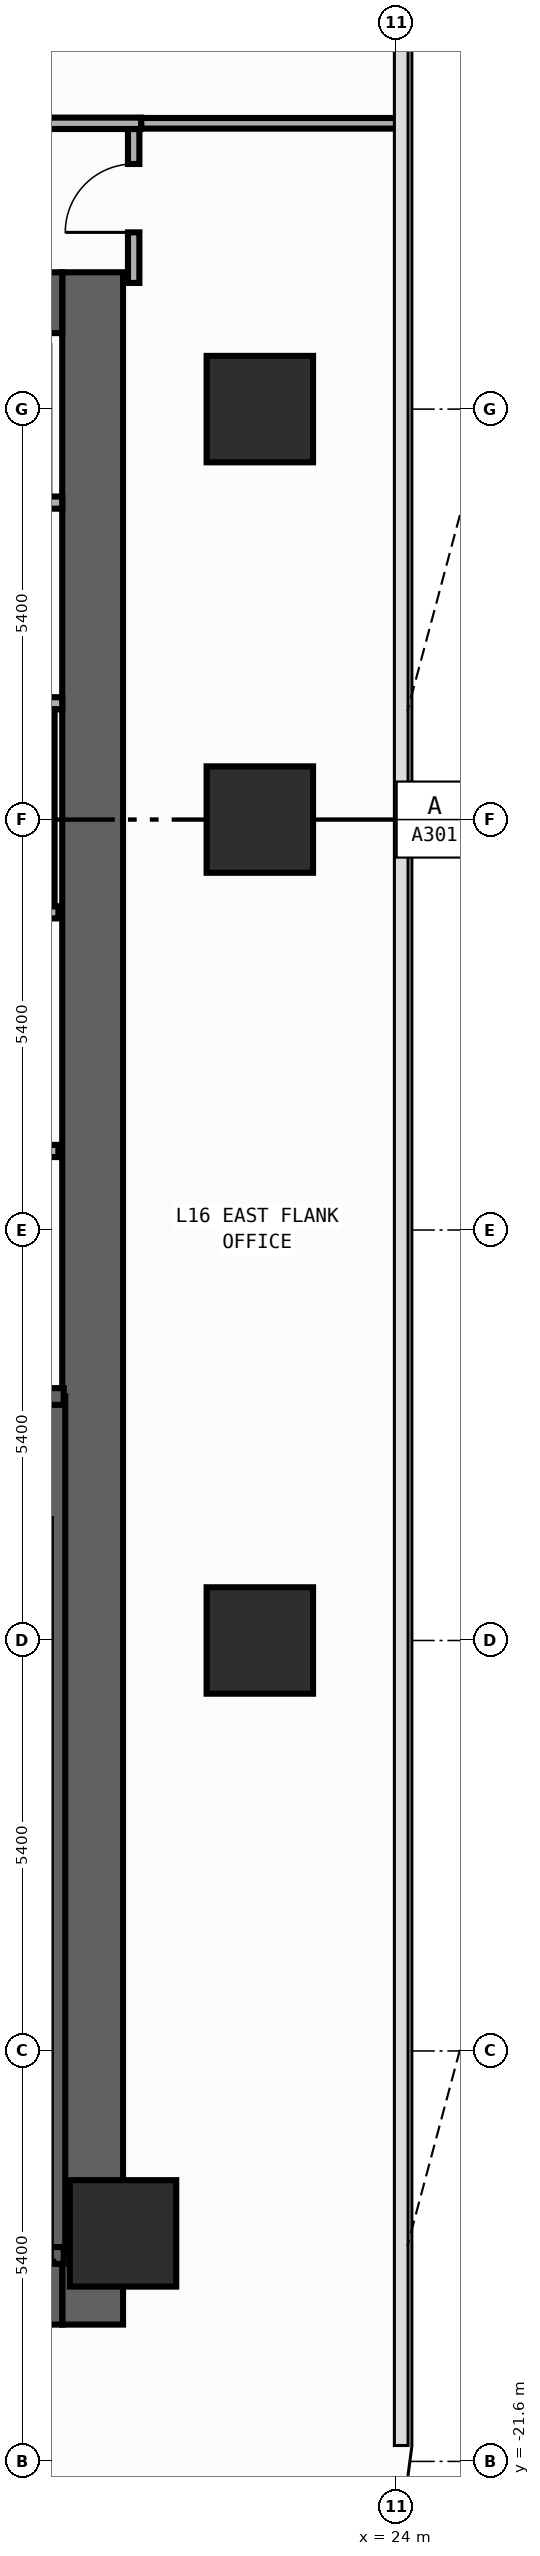
"""IFC4 building model, lengths in metres.
Left out: names, types, materials, properties, quantities, classifications, styles, units other than length and angle.
Written with IfcOpenShell. Run it as: python <this file> out.ifc"""

import sys

from ifc_helpers import new_model, si_unit, direction, frame, frame_2d, origin, origin_2d, place, context, subcontext, project, spatial, rectangle, extrude, element, fill, save


model = new_model("IFC4")
c1 = context("Model", 3, precision=1e-05, world=origin(), true_north=direction((0.0, 1.0)))
c2 = subcontext(c1, "Body", "Model", "MODEL_VIEW")
j1 = project(units=[si_unit("LENGTHUNIT", "METRE"), si_unit("PLANEANGLEUNIT", "RADIAN")], contexts=[c1])
p1 = place(None, origin())
s1 = spatial("IfcSite", under=j1, at=p1, CompositionType="ELEMENT")
p2 = place(p1, origin())
s2 = spatial("IfcBuilding", under=s1, at=p2, CompositionType="ELEMENT")
p3 = place(p2, frame((0.0, 0.0, 68.0)))
s3 = spatial("IfcBuildingStorey", under=s2, at=p3, CompositionType="ELEMENT", Elevation=68.0)
p4 = place(p3, frame((20.0, -19.8, 0.0), z_axis=(0.0, 0.0, 1.0), x_axis=(0.0, 1.0, 0.0)))
e1 = element("IfcWall", 1, at=p4, inside=s3, PredefinedType="SHEAR", context=c2, shape_type="SweptSolid", body=[
    extrude(rectangle(XDim=27.0, YDim=0.8, at=frame_2d((13.5, 0.0))), origin(), (0.0, 0.0, 1.0), 3.94),
])
for number, where, z_axis, x_axis in (
    (2, (12.8, -19.4, 0.0), (0.0, 0.0, 1.0), (1.0, 0.0, 0.0)),
    (3, (12.8, 6.8, 0.0), (0.0, 0.0, 1.0), (1.0, 0.0, 0.0)),
):
    element("IfcWall", number, at=place(p3, frame(where, z_axis=z_axis, x_axis=x_axis)), inside=s3, PredefinedType="SHEAR", context=c2, shape_type="SweptSolid", body=[
        extrude(rectangle(XDim=6.8, YDim=0.8, at=frame_2d((3.4, 0.0))), origin(), (0.0, 0.0, 1.0), 3.94),
    ])
p5 = place(p3, frame((19.53, -18.89, 0.0), z_axis=(0.0, 0.0, 1.0), x_axis=(0.0, 1.0, 0.0)))
e4 = element("IfcWall", 4, at=p5, inside=s3, PredefinedType="SHEAR", context=c2, shape_type="SweptSolid", body=[
    extrude(rectangle(XDim=11.3, YDim=0.22, at=frame_2d((5.65, 0.0))), origin(), (0.0, 0.0, 1.0), 3.94),
])
p6 = place(p3, frame((15.705, -18.89, 0.0), z_axis=(0.0, 0.0, 1.0), x_axis=(1.0, 0.0, 0.0)))
e5 = element("IfcWall", 5, at=p6, inside=s3, PredefinedType="SHEAR", context=c2, shape_type="SweptSolid", body=[
    extrude(rectangle(XDim=3.915, YDim=0.22, at=frame_2d((1.958, 0.0))), origin(), (0.0, 0.0, 1.0), 3.94),
])
p7 = place(p3, frame((19.62, -7.59, 0.0), z_axis=(0.0, 0.0, 1.0), x_axis=(-1.0, 0.0, 0.0)))
e6 = element("IfcWall", 6, at=p7, inside=s3, PredefinedType="SHEAR", context=c2, shape_type="SweptSolid", body=[
    extrude(rectangle(XDim=3.915, YDim=0.22, at=frame_2d((1.958, 0.0))), origin(), (0.0, 0.0, 1.0), 3.94),
])
p8 = place(p7, frame((1.08, 0.0, 0.0)))
e7 = element("IfcOpeningElement", 7, at=p8, cuts=e6, PredefinedType="OPENING", context=c2, shape_type="SweptSolid", body=[
    extrude(rectangle(XDim=1.1, YDim=2.2, at=frame_2d((0.55, 1.1))), frame((0.0, 0.12, 0.0), z_axis=(0.0, -1.0, 0.0), x_axis=(1.0, 0.0, 0.0)), (0.0, 0.0, 1.0), 0.24),
])
for number, where, z_axis, x_axis in (
    (8, (20.4, -18.6, 0.0), (0.0, 0.0, 1.0), (1.0, 0.0, 0.0)),
    (9, (22.2, -10.8, 0.0), (0.0, 0.0, 1.0), (1.0, 0.0, 0.0)),
    (10, (22.2, 0.0, 0.0), (0.0, 0.0, 1.0), (1.0, 0.0, 0.0)),
    (11, (22.2, 5.4, 0.0), (0.0, 0.0, 1.0), (1.0, 0.0, 0.0)),
):
    element("IfcColumn", number, at=place(p3, frame(where, z_axis=z_axis, x_axis=x_axis)), inside=s3, PredefinedType="COLUMN", context=c2, shape_type="SweptSolid", body=[
        extrude(rectangle(XDim=1.4, YDim=1.4, at=origin_2d()), origin(), (0.0, 0.0, 1.0), 4.2),
    ])
p9 = place(p3, frame((15.75, -4.36, 0.0), z_axis=(0.0, 0.0, 1.0), x_axis=(1.0, 0.0, 0.0)))
e12 = element("IfcWall", 12, at=p9, inside=s3, PredefinedType="STANDARD", context=c2, shape_type="SweptSolid", body=[
    extrude(rectangle(XDim=3.8, YDim=0.16, at=frame_2d((1.9, 0.0))), origin(), (0.0, 0.0, 1.0), 3.94),
])
p10 = place(p9, frame((1.47, 0.0, 0.0)))
e13 = element("IfcOpeningElement", 13, at=p10, cuts=e12, PredefinedType="OPENING", context=c2, shape_type="SweptSolid", body=[
    extrude(rectangle(XDim=1.15, YDim=2.2, at=frame_2d((0.575, 1.1))), frame((0.0, 0.09, 0.0), z_axis=(0.0, -1.0, 0.0), x_axis=(1.0, 0.0, 0.0)), (0.0, 0.0, 1.0), 0.18),
])
p11 = place(p3, frame((15.75, -1.22, 0.0), z_axis=(0.0, 0.0, 1.0), x_axis=(1.0, 0.0, 0.0)))
e14 = element("IfcWall", 14, at=p11, inside=s3, PredefinedType="STANDARD", context=c2, shape_type="SweptSolid", body=[
    extrude(rectangle(XDim=3.8, YDim=0.16, at=frame_2d((1.9, 0.0))), origin(), (0.0, 0.0, 1.0), 3.94),
])
for number, where, z_axis, x_axis in (
    (15, (17.31, 4.17, 0.0), (0.0, 0.0, 1.0), (1.0, 0.0, 0.0)),
    (16, (17.31, 1.53, 0.0), (0.0, 0.0, 1.0), (1.0, 0.0, 0.0)),
):
    element("IfcWall", number, at=place(p3, frame(where, z_axis=z_axis, x_axis=x_axis)), inside=s3, PredefinedType="PARTITIONING", context=c2, shape_type="SweptSolid", body=[
        extrude(rectangle(XDim=2.29, YDim=0.16, at=frame_2d((1.145, 0.0))), origin(), (0.0, 0.0, 1.0), 3.94),
    ])
p12 = place(p3, frame((20.54, 7.06, 0.0), z_axis=(0.0, 0.0, 1.0), x_axis=(0.0, 1.0, 0.0)))
e17 = element("IfcWall", 17, at=p12, inside=s3, PredefinedType="PARTITIONING", context=c2, shape_type="SweptSolid", body=[
    extrude(rectangle(XDim=2.025, YDim=0.15, at=frame_2d((1.012, 0.0))), origin(), (0.0, 0.0, 1.0), 3.94),
])
p13 = place(p12, frame((0.665, 0.0, 0.0)))
e18 = element("IfcOpeningElement", 18, at=p13, cuts=e17, PredefinedType="OPENING", context=c2, shape_type="SweptSolid", body=[
    extrude(rectangle(XDim=0.9, YDim=2.15, at=frame_2d((0.45, 1.075))), frame((0.0, 0.085, 0.0), z_axis=(0.0, -1.0, 0.0), x_axis=(1.0, 0.0, 0.0)), (0.0, 0.0, 1.0), 0.17),
])
p14 = place(p3, frame((11.81, 9.16, 0.0), z_axis=(0.0, 0.0, 1.0), x_axis=(1.0, 0.0, 0.0)))
e19 = element("IfcWall", 19, at=p14, inside=s3, PredefinedType="PARTITIONING", context=c2, shape_type="SweptSolid", body=[
    extrude(rectangle(XDim=8.83, YDim=0.15, at=frame_2d((4.415, 0.0))), origin(), (0.0, 0.0, 1.0), 3.94),
])
p15 = place(p14, frame((5.067, 0.0, 0.0)))
e20 = element("IfcOpeningElement", 20, at=p15, cuts=e19, PredefinedType="OPENING", context=c2, shape_type="SweptSolid", body=[
    extrude(rectangle(XDim=0.9, YDim=2.15, at=frame_2d((0.45, 1.075))), frame((0.0, 0.085, 0.0), z_axis=(0.0, -1.0, 0.0), x_axis=(1.0, 0.0, 0.0)), (0.0, 0.0, 1.0), 0.17),
])
p16 = place(p3, frame((20.64, 9.16, 0.0), z_axis=(0.0, 0.0, 1.0), x_axis=(1.0, 0.0, 0.0)))
e21 = element("IfcWall", 21, at=p16, inside=s3, PredefinedType="PARTITIONING", context=c2, shape_type="SweptSolid", body=[
    extrude(rectangle(XDim=3.415, YDim=0.14, at=frame_2d((1.708, 0.0))), origin(), (0.0, 0.0, 1.0), 3.94),
])
p17 = place(p3, frame((19.45, 1.45, 0.0), z_axis=(0.0, 0.0, 1.0), x_axis=(0.0, -1.0, 0.0)))
e22 = element("IfcWall", 22, at=p17, inside=s3, PredefinedType="PARTITIONING", context=c2, shape_type="SweptSolid", body=[
    extrude(rectangle(XDim=2.59, YDim=0.1, at=frame_2d((1.295, 0.0))), origin(), (0.0, 0.0, 1.0), 3.94),
])
p18 = place(p13, origin())
e23 = element("IfcDoor", 23, at=p18, inside=s3, OperationType="SINGLE_SWING_LEFT", PredefinedType="DOOR", context=c2, shape_type="SweptSolid", body=[
    extrude(rectangle(XDim=0.9, YDim=2.15, at=frame_2d((0.45, 1.075))), frame((0.0, 0.025, 0.0), z_axis=(0.0, -1.0, 0.0), x_axis=(1.0, 0.0, 0.0)), (0.0, 0.0, 1.0), 0.05),
])
fill(e18, e23)
save(model, sys.argv[1])
